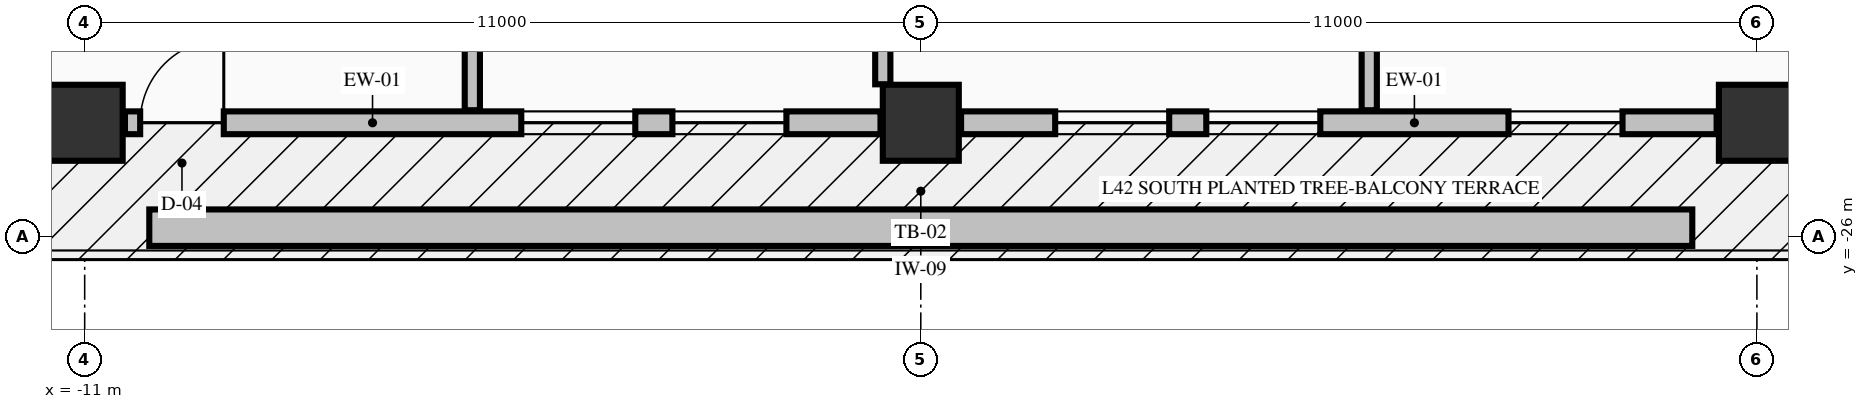
"""IFC4 building model, lengths in metres.
Left out: names, types, materials, properties, quantities, classifications, styles, units other than length and angle.
Written with IfcOpenShell. Run it as: python <this file> out.ifc"""

import sys

from ifc_helpers import new_model, si_unit, direction, frame, frame_2d, origin, origin_2d, place, context, subcontext, project, spatial, rectangle, extrude, element, fill, save


model = new_model("IFC4")
c1 = context("Model", 3, precision=1e-05, world=origin(), true_north=direction((0.0, 1.0)))
c2 = subcontext(c1, "Body", "Model", "MODEL_VIEW")
j1 = project(units=[si_unit("LENGTHUNIT", "METRE"), si_unit("PLANEANGLEUNIT", "RADIAN")], contexts=[c1])
p1 = place(None, origin())
s1 = spatial("IfcSite", under=j1, at=p1, CompositionType="ELEMENT")
p2 = place(p1, origin())
s2 = spatial("IfcBuilding", under=s1, at=p2, CompositionType="ELEMENT")
p3 = place(p2, frame((0.0, 0.0, 166.06)))
s3 = spatial("IfcBuildingStorey", under=s2, at=p3, CompositionType="ELEMENT", Elevation=166.06)
for number, where, z_axis, x_axis in (
    (1, (-11.0, -24.5, -0.25), (0.0, 0.0, 1.0), (1.0, 0.0, 0.0)),
    (2, (0.0, -24.5, -0.25), (0.0, 0.0, 1.0), (1.0, 0.0, 0.0)),
    (3, (11.0, -24.5, -0.25), (0.0, 0.0, 1.0), (1.0, 0.0, 0.0)),
):
    element("IfcColumn", number, at=place(p3, frame(where, z_axis=z_axis, x_axis=x_axis)), inside=s3, PredefinedType="COLUMN", context=c2, shape_type="SweptSolid", body=[
        extrude(rectangle(XDim=1.0, YDim=1.0, at=origin_2d()), origin(), (0.0, 0.0, 1.0), 3.4),
    ])
p4 = place(p3, frame((-10.47, -24.5, 0.0), z_axis=(0.0, 0.0, 1.0), x_axis=(1.0, 0.0, 0.0)))
e4 = element("IfcWall", 4, at=p4, inside=s3, PredefinedType="STANDARD", context=c2, shape_type="SweptSolid", body=[
    extrude(rectangle(XDim=9.94, YDim=0.3, at=frame_2d((4.97, 0.0))), origin(), (0.0, 0.0, 1.0), 2.542),
])
p5 = place(p4, frame((0.2, 0.0, 0.0)))
e5 = element("IfcOpeningElement", 5, at=p5, cuts=e4, PredefinedType="OPENING", context=c2, shape_type="SweptSolid", body=[
    extrude(rectangle(XDim=1.1, YDim=2.15, at=frame_2d((0.55, 1.075))), frame((0.0, 0.16, 0.0), z_axis=(0.0, -1.0, 0.0), x_axis=(1.0, 0.0, 0.0)), (0.0, 0.0, 1.0), 0.32),
])
p6 = place(p4, frame((5.214, 0.0, 0.72)))
e6 = element("IfcOpeningElement", 6, at=p6, cuts=e4, PredefinedType="OPENING", context=c2, shape_type="SweptSolid", body=[
    extrude(rectangle(XDim=1.5, YDim=1.6, at=frame_2d((0.75, 0.8))), frame((0.0, 0.16, 0.0), z_axis=(0.0, -1.0, 0.0), x_axis=(1.0, 0.0, 0.0)), (0.0, 0.0, 1.0), 0.32),
])
p7 = place(p4, frame((7.202, 0.0, 0.72)))
e7 = element("IfcOpeningElement", 7, at=p7, cuts=e4, PredefinedType="OPENING", context=c2, shape_type="SweptSolid", body=[
    extrude(rectangle(XDim=1.5, YDim=1.6, at=frame_2d((0.75, 0.8))), frame((0.0, 0.16, 0.0), z_axis=(0.0, -1.0, 0.0), x_axis=(1.0, 0.0, 0.0)), (0.0, 0.0, 1.0), 0.32),
])
p8 = place(p3, frame((0.53, -24.5, 0.0), z_axis=(0.0, 0.0, 1.0), x_axis=(1.0, 0.0, 0.0)))
e8 = element("IfcWall", 8, at=p8, inside=s3, PredefinedType="STANDARD", context=c2, shape_type="SweptSolid", body=[
    extrude(rectangle(XDim=9.94, YDim=0.3, at=frame_2d((4.97, 0.0))), origin(), (0.0, 0.0, 1.0), 2.542),
])
p9 = place(p8, frame((1.238, 0.0, 0.72)))
e9 = element("IfcOpeningElement", 9, at=p9, cuts=e8, PredefinedType="OPENING", context=c2, shape_type="SweptSolid", body=[
    extrude(rectangle(XDim=1.5, YDim=1.6, at=frame_2d((0.75, 0.8))), frame((0.0, 0.16, 0.0), z_axis=(0.0, -1.0, 0.0), x_axis=(1.0, 0.0, 0.0)), (0.0, 0.0, 1.0), 0.32),
])
p10 = place(p8, frame((3.226, 0.0, 0.72)))
e10 = element("IfcOpeningElement", 10, at=p10, cuts=e8, PredefinedType="OPENING", context=c2, shape_type="SweptSolid", body=[
    extrude(rectangle(XDim=1.5, YDim=1.6, at=frame_2d((0.75, 0.8))), frame((0.0, 0.16, 0.0), z_axis=(0.0, -1.0, 0.0), x_axis=(1.0, 0.0, 0.0)), (0.0, 0.0, 1.0), 0.32),
])
p11 = place(p8, frame((7.202, 0.0, 0.72)))
e11 = element("IfcOpeningElement", 11, at=p11, cuts=e8, PredefinedType="OPENING", context=c2, shape_type="SweptSolid", body=[
    extrude(rectangle(XDim=1.5, YDim=1.6, at=frame_2d((0.75, 0.8))), frame((0.0, 0.16, 0.0), z_axis=(0.0, -1.0, 0.0), x_axis=(1.0, 0.0, 0.0)), (0.0, 0.0, 1.0), 0.32),
])
p12 = place(p3, frame((-5.9, -24.335, 0.0), z_axis=(0.0, 0.0, 1.0), x_axis=(0.0, 1.0, 0.0)))
e12 = element("IfcWall", 12, at=p12, inside=s3, PredefinedType="PARTITIONING", context=c2, shape_type="SweptSolid", body=[
    extrude(rectangle(XDim=9.007, YDim=0.2, at=frame_2d((4.503, 0.0))), origin(), (0.0, 0.0, 1.0), 3.15),
])
p13 = place(p3, frame((-0.5, -23.994, 0.0), z_axis=(0.0, 0.0, 1.0), x_axis=(0.0, 1.0, 0.0)))
e13 = element("IfcWall", 13, at=p13, inside=s3, PredefinedType="PARTITIONING", context=c2, shape_type="SweptSolid", body=[
    extrude(rectangle(XDim=9.366, YDim=0.2, at=frame_2d((4.683, 0.0))), origin(), (0.0, 0.0, 1.0), 3.15),
])
p14 = place(p3, frame((5.9, -24.335, 0.0), z_axis=(0.0, 0.0, 1.0), x_axis=(0.0, 1.0, 0.0)))
e14 = element("IfcWall", 14, at=p14, inside=s3, PredefinedType="PARTITIONING", context=c2, shape_type="SweptSolid", body=[
    extrude(rectangle(XDim=9.007, YDim=0.2, at=frame_2d((4.503, 0.0))), origin(), (0.0, 0.0, 1.0), 3.15),
])
p15 = place(p3, frame((-10.15, -25.88, -0.04), z_axis=(0.0, 0.0, 1.0), x_axis=(1.0, 0.0, 0.0)))
e15 = element("IfcWall", 15, at=p15, inside=s3, PredefinedType="PARAPET", context=c2, shape_type="SweptSolid", body=[
    extrude(rectangle(XDim=20.3, YDim=0.48, at=frame_2d((10.15, 0.0))), origin(), (0.0, 0.0, 1.0), 0.52),
])
p16 = place(p5, origin())
e16 = element("IfcDoor", 16, at=p16, inside=s3, OperationType="SINGLE_SWING_RIGHT", PredefinedType="DOOR", context=c2, shape_type="SweptSolid", body=[
    extrude(rectangle(XDim=1.1, YDim=2.15, at=frame_2d((0.55, 1.075))), frame((0.0, 0.025, 0.0), z_axis=(0.0, -1.0, 0.0), x_axis=(1.0, 0.0, 0.0)), (0.0, 0.0, 1.0), 0.05),
])
fill(e5, e16)
p17 = place(p6, origin())
e17 = element("IfcWindow", 17, at=p17, inside=s3, PartitioningType="SINGLE_PANEL", PredefinedType="WINDOW", context=c2, shape_type="SweptSolid", body=[
    extrude(rectangle(XDim=1.5, YDim=1.6, at=frame_2d((0.75, 0.8))), frame((0.0, 0.03, 0.0), z_axis=(0.0, -1.0, 0.0), x_axis=(1.0, 0.0, 0.0)), (0.0, 0.0, 1.0), 0.06),
])
fill(e6, e17)
p18 = place(p7, origin())
e18 = element("IfcWindow", 18, at=p18, inside=s3, PartitioningType="SINGLE_PANEL", PredefinedType="WINDOW", context=c2, shape_type="SweptSolid", body=[
    extrude(rectangle(XDim=1.5, YDim=1.6, at=frame_2d((0.75, 0.8))), frame((0.0, 0.03, 0.0), z_axis=(0.0, -1.0, 0.0), x_axis=(1.0, 0.0, 0.0)), (0.0, 0.0, 1.0), 0.06),
])
fill(e7, e18)
p19 = place(p9, origin())
e19 = element("IfcWindow", 19, at=p19, inside=s3, PartitioningType="SINGLE_PANEL", PredefinedType="WINDOW", context=c2, shape_type="SweptSolid", body=[
    extrude(rectangle(XDim=1.5, YDim=1.6, at=frame_2d((0.75, 0.8))), frame((0.0, 0.03, 0.0), z_axis=(0.0, -1.0, 0.0), x_axis=(1.0, 0.0, 0.0)), (0.0, 0.0, 1.0), 0.06),
])
fill(e9, e19)
p20 = place(p10, origin())
e20 = element("IfcWindow", 20, at=p20, inside=s3, PartitioningType="SINGLE_PANEL", PredefinedType="WINDOW", context=c2, shape_type="SweptSolid", body=[
    extrude(rectangle(XDim=1.5, YDim=1.6, at=frame_2d((0.75, 0.8))), frame((0.0, 0.03, 0.0), z_axis=(0.0, -1.0, 0.0), x_axis=(1.0, 0.0, 0.0)), (0.0, 0.0, 1.0), 0.06),
])
fill(e10, e20)
p21 = place(p11, origin())
e21 = element("IfcWindow", 21, at=p21, inside=s3, PartitioningType="SINGLE_PANEL", PredefinedType="WINDOW", context=c2, shape_type="SweptSolid", body=[
    extrude(rectangle(XDim=1.5, YDim=1.6, at=frame_2d((0.75, 0.8))), frame((0.0, 0.03, 0.0), z_axis=(0.0, -1.0, 0.0), x_axis=(1.0, 0.0, 0.0)), (0.0, 0.0, 1.0), 0.06),
])
fill(e11, e21)
save(model, sys.argv[1])
